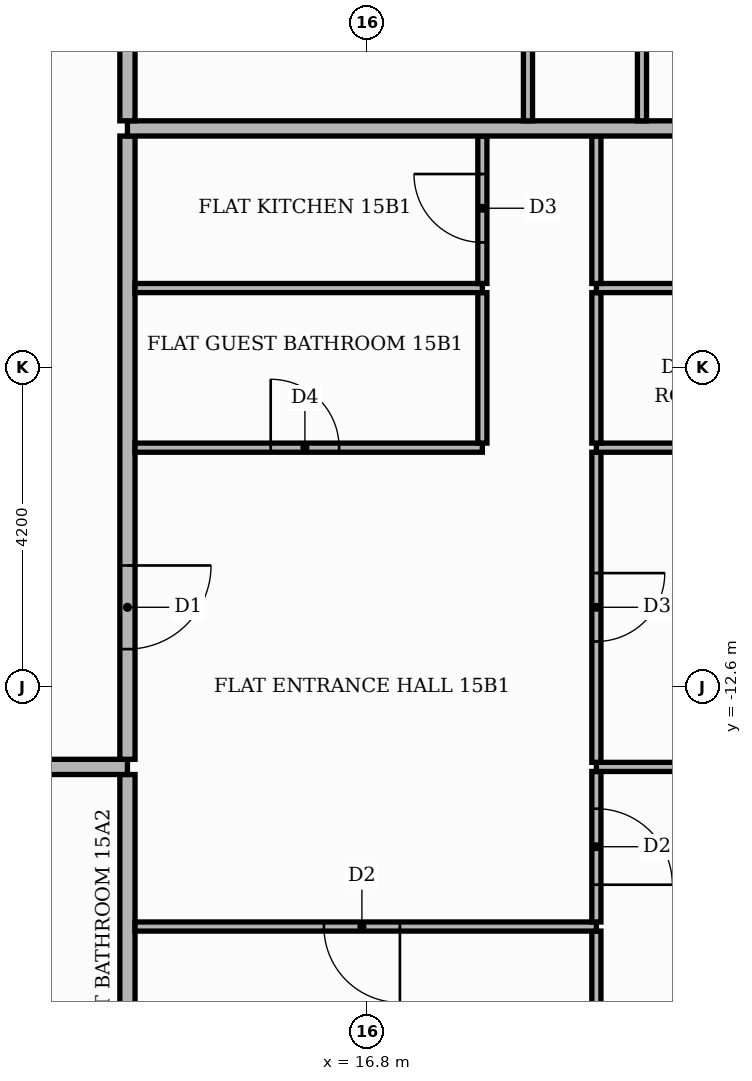
"""IFC4 building model, lengths in metres.
Left out: names, types, materials, properties, quantities, classifications, styles, units other than length and angle.
Written with IfcOpenShell. Run it as: python <this file> out.ifc"""

import sys

from ifc_helpers import new_model, si_unit, direction, frame, frame_2d, origin, place, context, subcontext, project, spatial, rectangle, extrude, element, fill, save


model = new_model("IFC4")
c1 = context("Model", 3, precision=1e-05, world=origin(), true_north=direction((0.0, 1.0)))
c2 = subcontext(c1, "Body", "Model", "MODEL_VIEW")
j1 = project(units=[si_unit("LENGTHUNIT", "METRE"), si_unit("PLANEANGLEUNIT", "RADIAN")], contexts=[c1])
p1 = place(None, origin())
s1 = spatial("IfcSite", under=j1, at=p1, CompositionType="ELEMENT")
p2 = place(p1, origin())
s2 = spatial("IfcBuilding", under=s1, at=p2, CompositionType="ELEMENT")
p3 = place(p2, frame((0.0, 0.0, 66.0)))
s3 = spatial("IfcBuildingStorey", under=s2, at=p3, CompositionType="ELEMENT", Elevation=66.0)
p4 = place(p3, frame((13.65, -20.42, 0.0), z_axis=(0.0, 0.0, 1.0), x_axis=(0.0, 1.0, 0.0)))
e1 = element("IfcWall", 1, at=p4, inside=s3, PredefinedType="PARTITIONING", context=c2, shape_type="SweptSolid", body=[
    extrude(rectangle(XDim=6.67, YDim=0.2, at=frame_2d((3.335, 0.0))), origin(), (0.0, 0.0, 1.0), 3.48),
])
p5 = place(p3, frame((19.82, -17.3, 0.0), z_axis=(0.0, 0.0, 1.0), x_axis=(0.0, 1.0, 0.0)))
e2 = element("IfcWall", 2, at=p5, inside=s3, PredefinedType="PARTITIONING", context=c2, shape_type="SweptSolid", body=[
    extrude(rectangle(XDim=1.49, YDim=0.12, at=frame_2d((0.745, 0.0))), origin(), (0.0, 0.0, 1.0), 3.48),
])
p6 = place(p3, frame((13.75, -15.75, 0.0), z_axis=(0.0, 0.0, 1.0), x_axis=(1.0, 0.0, 0.0)))
e3 = element("IfcWall", 3, at=p6, inside=s3, PredefinedType="PARTITIONING", context=c2, shape_type="SweptSolid", body=[
    extrude(rectangle(XDim=6.07, YDim=0.12, at=frame_2d((3.035, 0.0))), origin(), (0.0, 0.0, 1.0), 3.48),
])
p7 = place(p6, frame((2.485, 0.0, 0.0)))
e4 = element("IfcOpeningElement", 4, at=p7, cuts=e3, PredefinedType="OPENING", context=c2, shape_type="SweptSolid", body=[
    extrude(rectangle(XDim=1.0, YDim=2.1, at=frame_2d((0.5, 1.05))), frame((0.0, 0.07, 0.0), z_axis=(0.0, -1.0, 0.0), x_axis=(1.0, 0.0, 0.0)), (0.0, 0.0, 1.0), 0.14),
])
p8 = place(p3, frame((19.82, -15.69, 0.0), z_axis=(0.0, 0.0, 1.0), x_axis=(0.0, 1.0, 0.0)))
e5 = element("IfcWall", 5, at=p8, inside=s3, PredefinedType="PARTITIONING", context=c2, shape_type="SweptSolid", body=[
    extrude(rectangle(XDim=1.98, YDim=0.12, at=frame_2d((0.99, 0.0))), origin(), (0.0, 0.0, 1.0), 3.48),
])
p9 = place(p8, frame((0.49, 0.0, 0.0)))
e6 = element("IfcOpeningElement", 6, at=p9, cuts=e5, PredefinedType="OPENING", context=c2, shape_type="SweptSolid", body=[
    extrude(rectangle(XDim=1.0, YDim=2.1, at=frame_2d((0.5, 1.05))), frame((0.0, 0.07, 0.0), z_axis=(0.0, -1.0, 0.0), x_axis=(1.0, 0.0, 0.0)), (0.0, 0.0, 1.0), 0.14),
])
p10 = place(p3, frame((-25.42, -13.65, 0.0), z_axis=(0.0, 0.0, 1.0), x_axis=(1.0, 0.0, 0.0)))
e7 = element("IfcWall", 7, at=p10, inside=s3, PredefinedType="PARTITIONING", context=c2, shape_type="SweptSolid", body=[
    extrude(rectangle(XDim=39.07, YDim=0.2, at=frame_2d((19.535, 0.0))), origin(), (0.0, 0.0, 1.0), 3.48),
])
p11 = place(p10, frame((13.32, 0.0, 0.0)))
e8 = element("IfcOpeningElement", 8, at=p11, cuts=e7, PredefinedType="OPENING", context=c2, shape_type="SweptSolid", body=[
    extrude(rectangle(XDim=1.1, YDim=2.4, at=frame_2d((0.55, 1.2))), frame((0.0, 0.11, 0.0), z_axis=(0.0, -1.0, 0.0), x_axis=(1.0, 0.0, 0.0)), (0.0, 0.0, 1.0), 0.22),
])
p12 = place(p10, frame((21.72, 0.0, 0.0)))
e9 = element("IfcOpeningElement", 9, at=p12, cuts=e7, PredefinedType="OPENING", context=c2, shape_type="SweptSolid", body=[
    extrude(rectangle(XDim=1.1, YDim=2.4, at=frame_2d((0.55, 1.2))), frame((0.0, 0.11, 0.0), z_axis=(0.0, -1.0, 0.0), x_axis=(1.0, 0.0, 0.0)), (0.0, 0.0, 1.0), 0.22),
])
p13 = place(p3, frame((19.82, -13.65, 0.0), z_axis=(0.0, 0.0, 1.0), x_axis=(1.0, 0.0, 0.0)))
e10 = element("IfcWall", 10, at=p13, inside=s3, PredefinedType="PARTITIONING", context=c2, shape_type="SweptSolid", body=[
    extrude(rectangle(XDim=5.6, YDim=0.12, at=frame_2d((2.8, 0.0))), origin(), (0.0, 0.0, 1.0), 3.48),
])
p14 = place(p3, frame((19.82, -13.59, 0.0), z_axis=(0.0, 0.0, 1.0), x_axis=(0.0, 1.0, 0.0)))
e11 = element("IfcWall", 11, at=p14, inside=s3, PredefinedType="PARTITIONING", context=c2, shape_type="SweptSolid", body=[
    extrude(rectangle(XDim=4.08, YDim=0.12, at=frame_2d((2.04, 0.0))), origin(), (0.0, 0.0, 1.0), 3.48),
])
p15 = place(p14, frame((1.59, 0.0, 0.0)))
e12 = element("IfcOpeningElement", 12, at=p15, cuts=e11, PredefinedType="OPENING", context=c2, shape_type="SweptSolid", body=[
    extrude(rectangle(XDim=0.9, YDim=2.1, at=frame_2d((0.45, 1.05))), frame((0.0, 0.07, 0.0), z_axis=(0.0, -1.0, 0.0), x_axis=(1.0, 0.0, 0.0)), (0.0, 0.0, 1.0), 0.14),
])
p16 = place(p3, frame((13.65, -13.55, 0.0), z_axis=(0.0, 0.0, 1.0), x_axis=(0.0, 1.0, 0.0)))
e13 = element("IfcWall", 13, at=p16, inside=s3, PredefinedType="PARTITIONING", context=c2, shape_type="SweptSolid", body=[
    extrude(rectangle(XDim=8.2, YDim=0.2, at=frame_2d((4.1, 0.0))), origin(), (0.0, 0.0, 1.0), 3.48),
])
p17 = place(p16, frame((1.45, 0.0, 0.0)))
e14 = element("IfcOpeningElement", 14, at=p17, cuts=e13, PredefinedType="OPENING", context=c2, shape_type="SweptSolid", body=[
    extrude(rectangle(XDim=1.1, YDim=2.4, at=frame_2d((0.55, 1.2))), frame((0.0, 0.11, 0.0), z_axis=(0.0, -1.0, 0.0), x_axis=(1.0, 0.0, 0.0)), (0.0, 0.0, 1.0), 0.22),
])
p18 = place(p3, frame((13.75, -9.45, 0.0), z_axis=(0.0, 0.0, 1.0), x_axis=(1.0, 0.0, 0.0)))
e15 = element("IfcWall", 15, at=p18, inside=s3, PredefinedType="PARTITIONING", context=c2, shape_type="SweptSolid", body=[
    extrude(rectangle(XDim=4.57, YDim=0.12, at=frame_2d((2.285, 0.0))), origin(), (0.0, 0.0, 1.0), 3.48),
])
p19 = place(p18, frame((1.785, 0.0, 0.0)))
e16 = element("IfcOpeningElement", 16, at=p19, cuts=e15, PredefinedType="OPENING", context=c2, shape_type="SweptSolid", body=[
    extrude(rectangle(XDim=0.9, YDim=2.1, at=frame_2d((0.45, 1.05))), frame((0.0, 0.07, 0.0), z_axis=(0.0, -1.0, 0.0), x_axis=(1.0, 0.0, 0.0)), (0.0, 0.0, 1.0), 0.14),
])
p20 = place(p3, frame((19.82, -9.45, 0.0), z_axis=(0.0, 0.0, 1.0), x_axis=(1.0, 0.0, 0.0)))
e17 = element("IfcWall", 17, at=p20, inside=s3, PredefinedType="PARTITIONING", context=c2, shape_type="SweptSolid", body=[
    extrude(rectangle(XDim=5.6, YDim=0.12, at=frame_2d((2.8, 0.0))), origin(), (0.0, 0.0, 1.0), 3.48),
])
p21 = place(p20, frame((2.5, 0.0, 0.0)))
e18 = element("IfcOpeningElement", 18, at=p21, cuts=e17, PredefinedType="OPENING", context=c2, shape_type="SweptSolid", body=[
    extrude(rectangle(XDim=0.9, YDim=2.1, at=frame_2d((0.45, 1.05))), frame((0.0, 0.07, 0.0), z_axis=(0.0, -1.0, 0.0), x_axis=(1.0, 0.0, 0.0)), (0.0, 0.0, 1.0), 0.14),
])
for number, where, z_axis, x_axis in (
    (19, (18.32, -9.39, 0.0), (0.0, 0.0, 1.0), (0.0, 1.0, 0.0)),
    (20, (19.82, -9.39, 0.0), (0.0, 0.0, 1.0), (0.0, 1.0, 0.0)),
):
    element("IfcWall", number, at=place(p3, frame(where, z_axis=z_axis, x_axis=x_axis)), inside=s3, PredefinedType="PARTITIONING", context=c2, shape_type="SweptSolid", body=[
        extrude(rectangle(XDim=1.98, YDim=0.12, at=frame_2d((0.99, 0.0))), origin(), (0.0, 0.0, 1.0), 3.48),
    ])
p22 = place(p3, frame((13.75, -7.35, 0.0), z_axis=(0.0, 0.0, 1.0), x_axis=(1.0, 0.0, 0.0)))
e21 = element("IfcWall", 21, at=p22, inside=s3, PredefinedType="PARTITIONING", context=c2, shape_type="SweptSolid", body=[
    extrude(rectangle(XDim=4.57, YDim=0.12, at=frame_2d((2.285, 0.0))), origin(), (0.0, 0.0, 1.0), 3.48),
])
p23 = place(p3, frame((19.82, -7.35, 0.0), z_axis=(0.0, 0.0, 1.0), x_axis=(1.0, 0.0, 0.0)))
e22 = element("IfcWall", 22, at=p23, inside=s3, PredefinedType="PARTITIONING", context=c2, shape_type="SweptSolid", body=[
    extrude(rectangle(XDim=5.6, YDim=0.12, at=frame_2d((2.8, 0.0))), origin(), (0.0, 0.0, 1.0), 3.48),
])
p24 = place(p23, frame((2.5, 0.0, 0.0)))
e23 = element("IfcOpeningElement", 23, at=p24, cuts=e22, PredefinedType="OPENING", context=c2, shape_type="SweptSolid", body=[
    extrude(rectangle(XDim=0.9, YDim=2.1, at=frame_2d((0.45, 1.05))), frame((0.0, 0.07, 0.0), z_axis=(0.0, -1.0, 0.0), x_axis=(1.0, 0.0, 0.0)), (0.0, 0.0, 1.0), 0.14),
])
p25 = place(p3, frame((18.32, -7.29, 0.0), z_axis=(0.0, 0.0, 1.0), x_axis=(0.0, 1.0, 0.0)))
e24 = element("IfcWall", 24, at=p25, inside=s3, PredefinedType="PARTITIONING", context=c2, shape_type="SweptSolid", body=[
    extrude(rectangle(XDim=1.94, YDim=0.12, at=frame_2d((0.97, 0.0))), origin(), (0.0, 0.0, 1.0), 3.48),
])
p26 = place(p25, frame((0.54, 0.0, 0.0)))
e25 = element("IfcOpeningElement", 25, at=p26, cuts=e24, PredefinedType="OPENING", context=c2, shape_type="SweptSolid", body=[
    extrude(rectangle(XDim=0.9, YDim=2.1, at=frame_2d((0.45, 1.05))), frame((0.0, 0.07, 0.0), z_axis=(0.0, -1.0, 0.0), x_axis=(1.0, 0.0, 0.0)), (0.0, 0.0, 1.0), 0.14),
])
p27 = place(p3, frame((19.82, -7.29, 0.0), z_axis=(0.0, 0.0, 1.0), x_axis=(0.0, 1.0, 0.0)))
e26 = element("IfcWall", 26, at=p27, inside=s3, PredefinedType="PARTITIONING", context=c2, shape_type="SweptSolid", body=[
    extrude(rectangle(XDim=1.94, YDim=0.12, at=frame_2d((0.97, 0.0))), origin(), (0.0, 0.0, 1.0), 3.48),
])
p28 = place(p3, frame((13.65, -5.25, 0.0), z_axis=(0.0, 0.0, 1.0), x_axis=(1.0, 0.0, 0.0)))
e27 = element("IfcWall", 27, at=p28, inside=s3, PredefinedType="PARTITIONING", context=c2, shape_type="SweptSolid", body=[
    extrude(rectangle(XDim=11.77, YDim=0.2, at=frame_2d((5.885, 0.0))), origin(), (0.0, 0.0, 1.0), 3.48),
])
p29 = place(p3, frame((13.65, -5.15, 0.0), z_axis=(0.0, 0.0, 1.0), x_axis=(0.0, 1.0, 0.0)))
e28 = element("IfcWall", 28, at=p29, inside=s3, PredefinedType="PARTITIONING", context=c2, shape_type="SweptSolid", body=[
    extrude(rectangle(XDim=18.7, YDim=0.2, at=frame_2d((9.35, 0.0))), origin(), (0.0, 0.0, 1.0), 3.48),
])
p30 = place(p29, frame((5.65, 0.0, 0.0)))
e29 = element("IfcOpeningElement", 29, at=p30, cuts=e28, PredefinedType="OPENING", context=c2, shape_type="SweptSolid", body=[
    extrude(rectangle(XDim=1.1, YDim=2.4, at=frame_2d((0.55, 1.2))), frame((0.0, 0.11, 0.0), z_axis=(0.0, -1.0, 0.0), x_axis=(1.0, 0.0, 0.0)), (0.0, 0.0, 1.0), 0.22),
])
p31 = place(p3, frame((18.92, -5.15, 0.0), z_axis=(0.0, 0.0, 1.0), x_axis=(0.0, 1.0, 0.0)))
e30 = element("IfcWall", 30, at=p31, inside=s3, PredefinedType="PARTITIONING", context=c2, shape_type="SweptSolid", body=[
    extrude(rectangle(XDim=4.04, YDim=0.12, at=frame_2d((2.02, 0.0))), origin(), (0.0, 0.0, 1.0), 3.48),
])
p32 = place(p3, frame((20.42, -5.15, 0.0), z_axis=(0.0, 0.0, 1.0), x_axis=(0.0, 1.0, 0.0)))
e31 = element("IfcWall", 31, at=p32, inside=s3, PredefinedType="PARTITIONING", context=c2, shape_type="SweptSolid", body=[
    extrude(rectangle(XDim=4.04, YDim=0.12, at=frame_2d((2.02, 0.0))), origin(), (0.0, 0.0, 1.0), 3.48),
])
p33 = place(p32, frame((1.5, 0.0, 0.0)))
e32 = element("IfcOpeningElement", 32, at=p33, cuts=e31, PredefinedType="OPENING", context=c2, shape_type="SweptSolid", body=[
    extrude(rectangle(XDim=1.0, YDim=2.1, at=frame_2d((0.5, 1.05))), frame((0.0, 0.07, 0.0), z_axis=(0.0, -1.0, 0.0), x_axis=(1.0, 0.0, 0.0)), (0.0, 0.0, 1.0), 0.14),
])
p34 = place(p17, frame((1.1, 0.0, 0.0), z_axis=(0.0, 0.0, 1.0), x_axis=(-1.0, 0.0, 0.0)))
e33 = element("IfcDoor", 33, at=p34, inside=s3, OperationType="SINGLE_SWING_RIGHT", PredefinedType="DOOR", context=c2, shape_type="SweptSolid", body=[
    extrude(rectangle(XDim=1.1, YDim=2.4, at=frame_2d((0.55, 1.2))), frame((0.0, 0.025, 0.0), z_axis=(0.0, -1.0, 0.0), x_axis=(1.0, 0.0, 0.0)), (0.0, 0.0, 1.0), 0.05),
])
fill(e14, e33)
p35 = place(p7, frame((1.0, 0.0, 0.0), z_axis=(0.0, 0.0, 1.0), x_axis=(-1.0, 0.0, 0.0)))
e34 = element("IfcDoor", 34, at=p35, inside=s3, OperationType="SINGLE_SWING_RIGHT", PredefinedType="DOOR", context=c2, shape_type="SweptSolid", body=[
    extrude(rectangle(XDim=1.0, YDim=2.1, at=frame_2d((0.5, 1.05))), frame((0.0, 0.025, 0.0), z_axis=(0.0, -1.0, 0.0), x_axis=(1.0, 0.0, 0.0)), (0.0, 0.0, 1.0), 0.05),
])
fill(e4, e34)
p36 = place(p19, origin())
e35 = element("IfcDoor", 35, at=p36, inside=s3, OperationType="SINGLE_SWING_LEFT", PredefinedType="DOOR", context=c2, shape_type="SweptSolid", body=[
    extrude(rectangle(XDim=0.9, YDim=2.1, at=frame_2d((0.45, 1.05))), frame((0.0, 0.025, 0.0), z_axis=(0.0, -1.0, 0.0), x_axis=(1.0, 0.0, 0.0)), (0.0, 0.0, 1.0), 0.05),
])
fill(e16, e35)
p37 = place(p26, origin())
e36 = element("IfcDoor", 36, at=p37, inside=s3, OperationType="SINGLE_SWING_RIGHT", PredefinedType="DOOR", context=c2, shape_type="SweptSolid", body=[
    extrude(rectangle(XDim=0.9, YDim=2.1, at=frame_2d((0.45, 1.05))), frame((0.0, 0.025, 0.0), z_axis=(0.0, -1.0, 0.0), x_axis=(1.0, 0.0, 0.0)), (0.0, 0.0, 1.0), 0.05),
])
fill(e25, e36)
p38 = place(p9, frame((1.0, 0.0, 0.0), z_axis=(0.0, 0.0, 1.0), x_axis=(-1.0, 0.0, 0.0)))
e37 = element("IfcDoor", 37, at=p38, inside=s3, OperationType="SINGLE_SWING_LEFT", PredefinedType="DOOR", context=c2, shape_type="SweptSolid", body=[
    extrude(rectangle(XDim=1.0, YDim=2.1, at=frame_2d((0.5, 1.05))), frame((0.0, 0.025, 0.0), z_axis=(0.0, -1.0, 0.0), x_axis=(1.0, 0.0, 0.0)), (0.0, 0.0, 1.0), 0.05),
])
fill(e6, e37)
p39 = place(p15, frame((0.9, 0.0, 0.0), z_axis=(0.0, 0.0, 1.0), x_axis=(-1.0, 0.0, 0.0)))
e38 = element("IfcDoor", 38, at=p39, inside=s3, OperationType="SINGLE_SWING_RIGHT", PredefinedType="DOOR", context=c2, shape_type="SweptSolid", body=[
    extrude(rectangle(XDim=0.9, YDim=2.1, at=frame_2d((0.45, 1.05))), frame((0.0, 0.025, 0.0), z_axis=(0.0, -1.0, 0.0), x_axis=(1.0, 0.0, 0.0)), (0.0, 0.0, 1.0), 0.05),
])
fill(e12, e38)
save(model, sys.argv[1])
